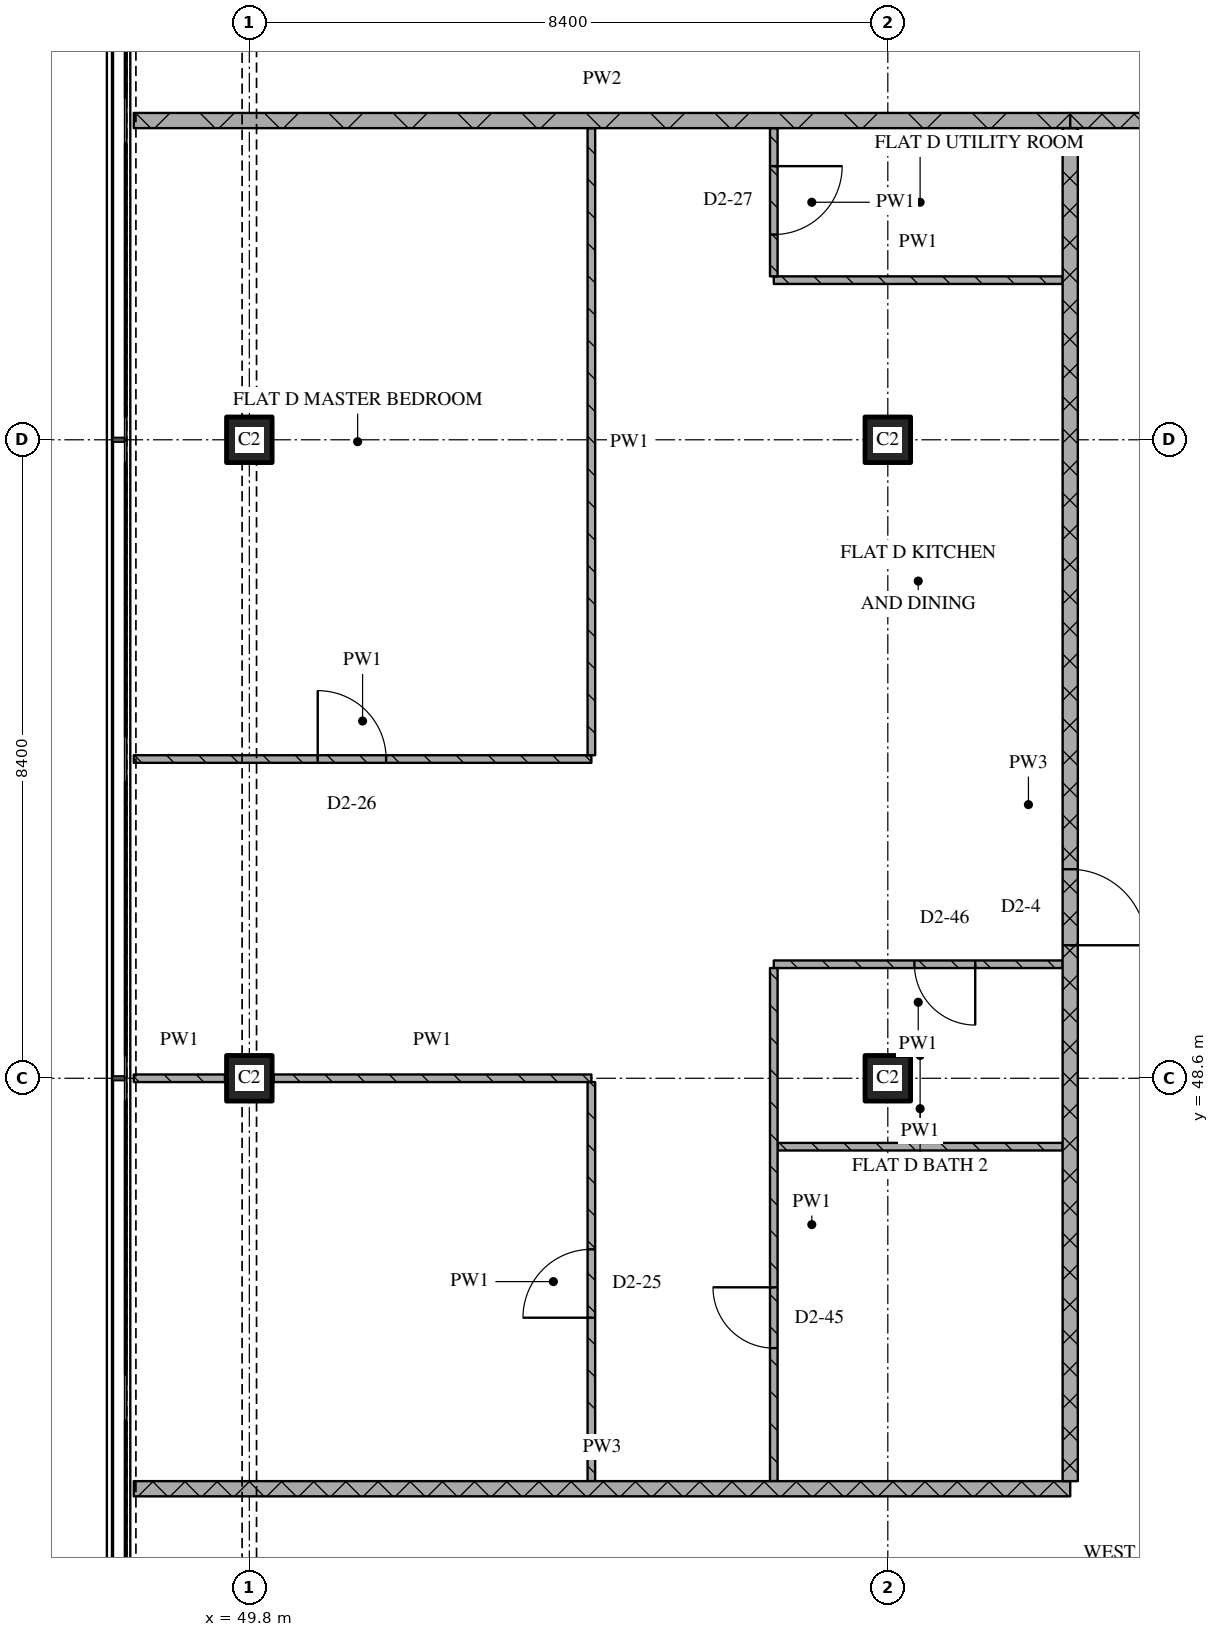
"""IFC4 building model, lengths in metres.
Left out: names, types, materials, properties, quantities, classifications, styles, units other than length and angle.
Written with IfcOpenShell. Run it as: python <this file> out.ifc"""

import sys

from ifc_helpers import new_model, si_unit, direction, frame, frame_2d, origin, origin_2d, place, context, subcontext, project, spatial, rectangle, extrude, element, fill, save


model = new_model("IFC4")
c1 = context("Model", 3, precision=1e-05, world=origin(), true_north=direction((0.0, 1.0)))
c2 = subcontext(c1, "Body", "Model", "MODEL_VIEW")
j1 = project(units=[si_unit("LENGTHUNIT", "METRE"), si_unit("PLANEANGLEUNIT", "RADIAN")], contexts=[c1])
p1 = place(None, origin())
s1 = spatial("IfcSite", under=j1, at=p1, CompositionType="ELEMENT")
p2 = place(p1, origin())
s2 = spatial("IfcBuilding", under=s1, at=p2, CompositionType="ELEMENT")
p3 = place(p2, frame((0.0, 0.0, 219.9)))
s3 = spatial("IfcBuildingStorey", under=s2, at=p3, CompositionType="ELEMENT", Elevation=219.9)
for number, where, z_axis, x_axis in (
    (1, (49.8, 48.6, 0.0), (0.0, 0.0, 1.0), (1.0, 0.0, 0.0)),
    (2, (49.8, 57.0, 0.0), (0.0, 0.0, 1.0), (1.0, 0.0, 0.0)),
    (3, (58.2, 48.6, 0.0), (0.0, 0.0, 1.0), (1.0, 0.0, 0.0)),
    (4, (58.2, 57.0, 0.0), (0.0, 0.0, 1.0), (1.0, 0.0, 0.0)),
):
    element("IfcColumn", number, at=place(p3, frame(where, z_axis=z_axis, x_axis=x_axis)), inside=s3, PredefinedType="COLUMN", context=c2, shape_type="SweptSolid", body=[
        extrude(rectangle(XDim=0.6, YDim=0.6, at=origin_2d()), origin(), (0.0, 0.0, 1.0), 3.6),
    ])
p4 = place(p3, frame((48.28, 43.2, 0.0), z_axis=(0.0, 0.0, 1.0), x_axis=(1.0, 0.0, 0.0)))
e5 = element("IfcWall", 5, at=p4, inside=s3, PredefinedType="PARTITIONING", context=c2, shape_type="SweptSolid", body=[
    extrude(rectangle(XDim=12.32, YDim=0.2, at=frame_2d((6.16, 0.0))), origin(), (0.0, 0.0, 1.0), 3.32),
])
p5 = place(p3, frame((56.75, 47.7, 0.0), z_axis=(0.0, 0.0, 1.0), x_axis=(1.0, 0.0, 0.0)))
e6 = element("IfcWall", 6, at=p5, inside=s3, PredefinedType="PARTITIONING", context=c2, shape_type="SweptSolid", body=[
    extrude(rectangle(XDim=3.75, YDim=0.1, at=frame_2d((1.875, 0.0))), origin(), (0.0, 0.0, 1.0), 3.32),
])
p6 = place(p3, frame((48.28, 48.6, 0.0), z_axis=(0.0, 0.0, 1.0), x_axis=(1.0, 0.0, 0.0)))
e7 = element("IfcWall", 7, at=p6, inside=s3, PredefinedType="PARTITIONING", context=c2, shape_type="SweptSolid", body=[
    extrude(rectangle(XDim=1.2, YDim=0.1, at=frame_2d((0.6, 0.0))), origin(), (0.0, 0.0, 1.0), 3.32),
])
p7 = place(p3, frame((50.12, 48.6, 0.0), z_axis=(0.0, 0.0, 1.0), x_axis=(1.0, 0.0, 0.0)))
e8 = element("IfcWall", 8, at=p7, inside=s3, PredefinedType="PARTITIONING", context=c2, shape_type="SweptSolid", body=[
    extrude(rectangle(XDim=4.18, YDim=0.1, at=frame_2d((2.09, 0.0))), origin(), (0.0, 0.0, 1.0), 3.32),
])
p8 = place(p3, frame((60.5, 50.1, 0.0), z_axis=(0.0, 0.0, 1.0), x_axis=(-1.0, 0.0, 0.0)))
e9 = element("IfcWall", 9, at=p8, inside=s3, PredefinedType="PARTITIONING", context=c2, shape_type="SweptSolid", body=[
    extrude(rectangle(XDim=3.8, YDim=0.1, at=frame_2d((1.9, 0.0))), origin(), (0.0, 0.0, 1.0), 3.32),
])
p9 = place(p8, frame((1.15, 0.0, 0.0)))
e10 = element("IfcOpeningElement", 10, at=p9, cuts=e9, PredefinedType="OPENING", context=c2, shape_type="SweptSolid", body=[
    extrude(rectangle(XDim=0.8, YDim=2.1, at=frame_2d((0.4, 1.05))), frame((0.0, 0.06, 0.0), z_axis=(0.0, -1.0, 0.0), x_axis=(1.0, 0.0, 0.0)), (0.0, 0.0, 1.0), 0.12),
])
p10 = place(p3, frame((48.28, 52.8, 0.0), z_axis=(0.0, 0.0, 1.0), x_axis=(1.0, 0.0, 0.0)))
e11 = element("IfcWall", 11, at=p10, inside=s3, PredefinedType="PARTITIONING", context=c2, shape_type="SweptSolid", body=[
    extrude(rectangle(XDim=6.02, YDim=0.1, at=frame_2d((3.01, 0.0))), origin(), (0.0, 0.0, 1.0), 3.32),
])
p11 = place(p10, frame((2.42, 0.0, 0.0)))
e12 = element("IfcOpeningElement", 12, at=p11, cuts=e11, PredefinedType="OPENING", context=c2, shape_type="SweptSolid", body=[
    extrude(rectangle(XDim=0.9, YDim=2.1, at=frame_2d((0.45, 1.05))), frame((0.0, 0.06, 0.0), z_axis=(0.0, -1.0, 0.0), x_axis=(1.0, 0.0, 0.0)), (0.0, 0.0, 1.0), 0.12),
])
p12 = place(p3, frame((56.7, 59.1, 0.0), z_axis=(0.0, 0.0, 1.0), x_axis=(1.0, 0.0, 0.0)))
e13 = element("IfcWall", 13, at=p12, inside=s3, PredefinedType="PARTITIONING", context=c2, shape_type="SweptSolid", body=[
    extrude(rectangle(XDim=3.8, YDim=0.1, at=frame_2d((1.9, 0.0))), origin(), (0.0, 0.0, 1.0), 3.32),
])
p13 = place(p3, frame((60.6, 61.2, 0.0), z_axis=(0.0, 0.0, 1.0), x_axis=(1.0, 0.0, 0.0)))
e14 = element("IfcWall", 14, at=p13, inside=s3, PredefinedType="PARTITIONING", context=c2, shape_type="SweptSolid", body=[
    extrude(rectangle(XDim=3.6, YDim=0.2, at=frame_2d((1.8, 0.0))), origin(), (0.0, 0.0, 1.0), 3.32),
])
p14 = place(p3, frame((48.28, 61.2, 0.0), z_axis=(0.0, 0.0, 1.0), x_axis=(1.0, 0.0, 0.0)))
e15 = element("IfcWall", 15, at=p14, inside=s3, PredefinedType="PARTITIONING", context=c2, shape_type="SweptSolid", body=[
    extrude(rectangle(XDim=12.32, YDim=0.2, at=frame_2d((6.16, 0.0))), origin(), (0.0, 0.0, 1.0), 3.32),
])
p15 = place(p3, frame((54.3, 43.3, 0.0), z_axis=(0.0, 0.0, 1.0), x_axis=(0.0, 1.0, 0.0)))
e16 = element("IfcWall", 16, at=p15, inside=s3, PredefinedType="PARTITIONING", context=c2, shape_type="SweptSolid", body=[
    extrude(rectangle(XDim=5.25, YDim=0.1, at=frame_2d((2.625, 0.0))), origin(), (0.0, 0.0, 1.0), 3.32),
])
p16 = place(p15, frame((2.15, 0.0, 0.0)))
e17 = element("IfcOpeningElement", 17, at=p16, cuts=e16, PredefinedType="OPENING", context=c2, shape_type="SweptSolid", body=[
    extrude(rectangle(XDim=0.9, YDim=2.1, at=frame_2d((0.45, 1.05))), frame((0.0, 0.06, 0.0), z_axis=(0.0, -1.0, 0.0), x_axis=(1.0, 0.0, 0.0)), (0.0, 0.0, 1.0), 0.12),
])
p17 = place(p3, frame((54.3, 61.1, 0.0), z_axis=(0.0, 0.0, 1.0), x_axis=(0.0, -1.0, 0.0)))
e18 = element("IfcWall", 18, at=p17, inside=s3, PredefinedType="PARTITIONING", context=c2, shape_type="SweptSolid", body=[
    extrude(rectangle(XDim=8.25, YDim=0.1, at=frame_2d((4.125, 0.0))), origin(), (0.0, 0.0, 1.0), 3.32),
])
p18 = place(p3, frame((56.7, 50.05, 0.0), z_axis=(0.0, 0.0, 1.0), x_axis=(0.0, -1.0, 0.0)))
e19 = element("IfcWall", 19, at=p18, inside=s3, PredefinedType="PARTITIONING", context=c2, shape_type="SweptSolid", body=[
    extrude(rectangle(XDim=6.75, YDim=0.1, at=frame_2d((3.375, 0.0))), origin(), (0.0, 0.0, 1.0), 3.32),
])
p19 = place(p18, frame((4.2, 0.0, 0.0)))
e20 = element("IfcOpeningElement", 20, at=p19, cuts=e19, PredefinedType="OPENING", context=c2, shape_type="SweptSolid", body=[
    extrude(rectangle(XDim=0.8, YDim=2.1, at=frame_2d((0.4, 1.05))), frame((0.0, 0.06, 0.0), z_axis=(0.0, -1.0, 0.0), x_axis=(1.0, 0.0, 0.0)), (0.0, 0.0, 1.0), 0.12),
])
p20 = place(p3, frame((56.7, 61.1, 0.0), z_axis=(0.0, 0.0, 1.0), x_axis=(0.0, -1.0, 0.0)))
e21 = element("IfcWall", 21, at=p20, inside=s3, PredefinedType="PARTITIONING", context=c2, shape_type="SweptSolid", body=[
    extrude(rectangle(XDim=1.95, YDim=0.1, at=frame_2d((0.975, 0.0))), origin(), (0.0, 0.0, 1.0), 3.32),
])
p21 = place(p20, frame((0.5, 0.0, 0.0)))
e22 = element("IfcOpeningElement", 22, at=p21, cuts=e21, PredefinedType="OPENING", context=c2, shape_type="SweptSolid", body=[
    extrude(rectangle(XDim=0.9, YDim=2.1, at=frame_2d((0.45, 1.05))), frame((0.0, 0.06, 0.0), z_axis=(0.0, -1.0, 0.0), x_axis=(1.0, 0.0, 0.0)), (0.0, 0.0, 1.0), 0.12),
])
p22 = place(p3, frame((60.6, 43.3, 0.0), z_axis=(0.0, 0.0, 1.0), x_axis=(0.0, 1.0, 0.0)))
e23 = element("IfcWall", 23, at=p22, inside=s3, PredefinedType="PARTITIONING", context=c2, shape_type="SweptSolid", body=[
    extrude(rectangle(XDim=17.8, YDim=0.2, at=frame_2d((8.9, 0.0))), origin(), (0.0, 0.0, 1.0), 3.32),
])
p23 = place(p22, frame((7.05, 0.0, 0.0)))
e24 = element("IfcOpeningElement", 24, at=p23, cuts=e23, PredefinedType="OPENING", context=c2, shape_type="SweptSolid", body=[
    extrude(rectangle(XDim=1.0, YDim=2.1, at=frame_2d((0.5, 1.05))), frame((0.0, 0.11, 0.0), z_axis=(0.0, -1.0, 0.0), x_axis=(1.0, 0.0, 0.0)), (0.0, 0.0, 1.0), 0.22),
])
p24 = place(p9, origin())
e25 = element("IfcDoor", 25, at=p24, inside=s3, OperationType="SINGLE_SWING_LEFT", PredefinedType="DOOR", context=c2, shape_type="SweptSolid", body=[
    extrude(rectangle(XDim=0.8, YDim=2.1, at=frame_2d((0.4, 1.05))), frame((0.0, 0.025, 0.0), z_axis=(0.0, -1.0, 0.0), x_axis=(1.0, 0.0, 0.0)), (0.0, 0.0, 1.0), 0.05),
])
fill(e10, e25)
p25 = place(p11, origin())
e26 = element("IfcDoor", 26, at=p25, inside=s3, OperationType="SINGLE_SWING_LEFT", PredefinedType="DOOR", context=c2, shape_type="SweptSolid", body=[
    extrude(rectangle(XDim=0.9, YDim=2.1, at=frame_2d((0.45, 1.05))), frame((0.0, 0.025, 0.0), z_axis=(0.0, -1.0, 0.0), x_axis=(1.0, 0.0, 0.0)), (0.0, 0.0, 1.0), 0.05),
])
fill(e12, e26)
p26 = place(p16, origin())
e27 = element("IfcDoor", 27, at=p26, inside=s3, OperationType="SINGLE_SWING_LEFT", PredefinedType="DOOR", context=c2, shape_type="SweptSolid", body=[
    extrude(rectangle(XDim=0.9, YDim=2.1, at=frame_2d((0.45, 1.05))), frame((0.0, 0.025, 0.0), z_axis=(0.0, -1.0, 0.0), x_axis=(1.0, 0.0, 0.0)), (0.0, 0.0, 1.0), 0.05),
])
fill(e17, e27)
p27 = place(p19, origin())
e28 = element("IfcDoor", 28, at=p27, inside=s3, OperationType="SINGLE_SWING_RIGHT", PredefinedType="DOOR", context=c2, shape_type="SweptSolid", body=[
    extrude(rectangle(XDim=0.8, YDim=2.1, at=frame_2d((0.4, 1.05))), frame((0.0, 0.025, 0.0), z_axis=(0.0, -1.0, 0.0), x_axis=(1.0, 0.0, 0.0)), (0.0, 0.0, 1.0), 0.05),
])
fill(e20, e28)
p28 = place(p21, origin())
e29 = element("IfcDoor", 29, at=p28, inside=s3, OperationType="SINGLE_SWING_LEFT", PredefinedType="DOOR", context=c2, shape_type="SweptSolid", body=[
    extrude(rectangle(XDim=0.9, YDim=2.1, at=frame_2d((0.45, 1.05))), frame((0.0, 0.025, 0.0), z_axis=(0.0, -1.0, 0.0), x_axis=(1.0, 0.0, 0.0)), (0.0, 0.0, 1.0), 0.05),
])
fill(e22, e29)
p29 = place(p23, origin())
e30 = element("IfcDoor", 30, at=p29, inside=s3, OperationType="SINGLE_SWING_RIGHT", PredefinedType="DOOR", context=c2, shape_type="SweptSolid", body=[
    extrude(rectangle(XDim=1.0, YDim=2.1, at=frame_2d((0.5, 1.05))), frame((0.0, 0.025, 0.0), z_axis=(0.0, -1.0, 0.0), x_axis=(1.0, 0.0, 0.0)), (0.0, 0.0, 1.0), 0.05),
])
fill(e24, e30)
save(model, sys.argv[1])
